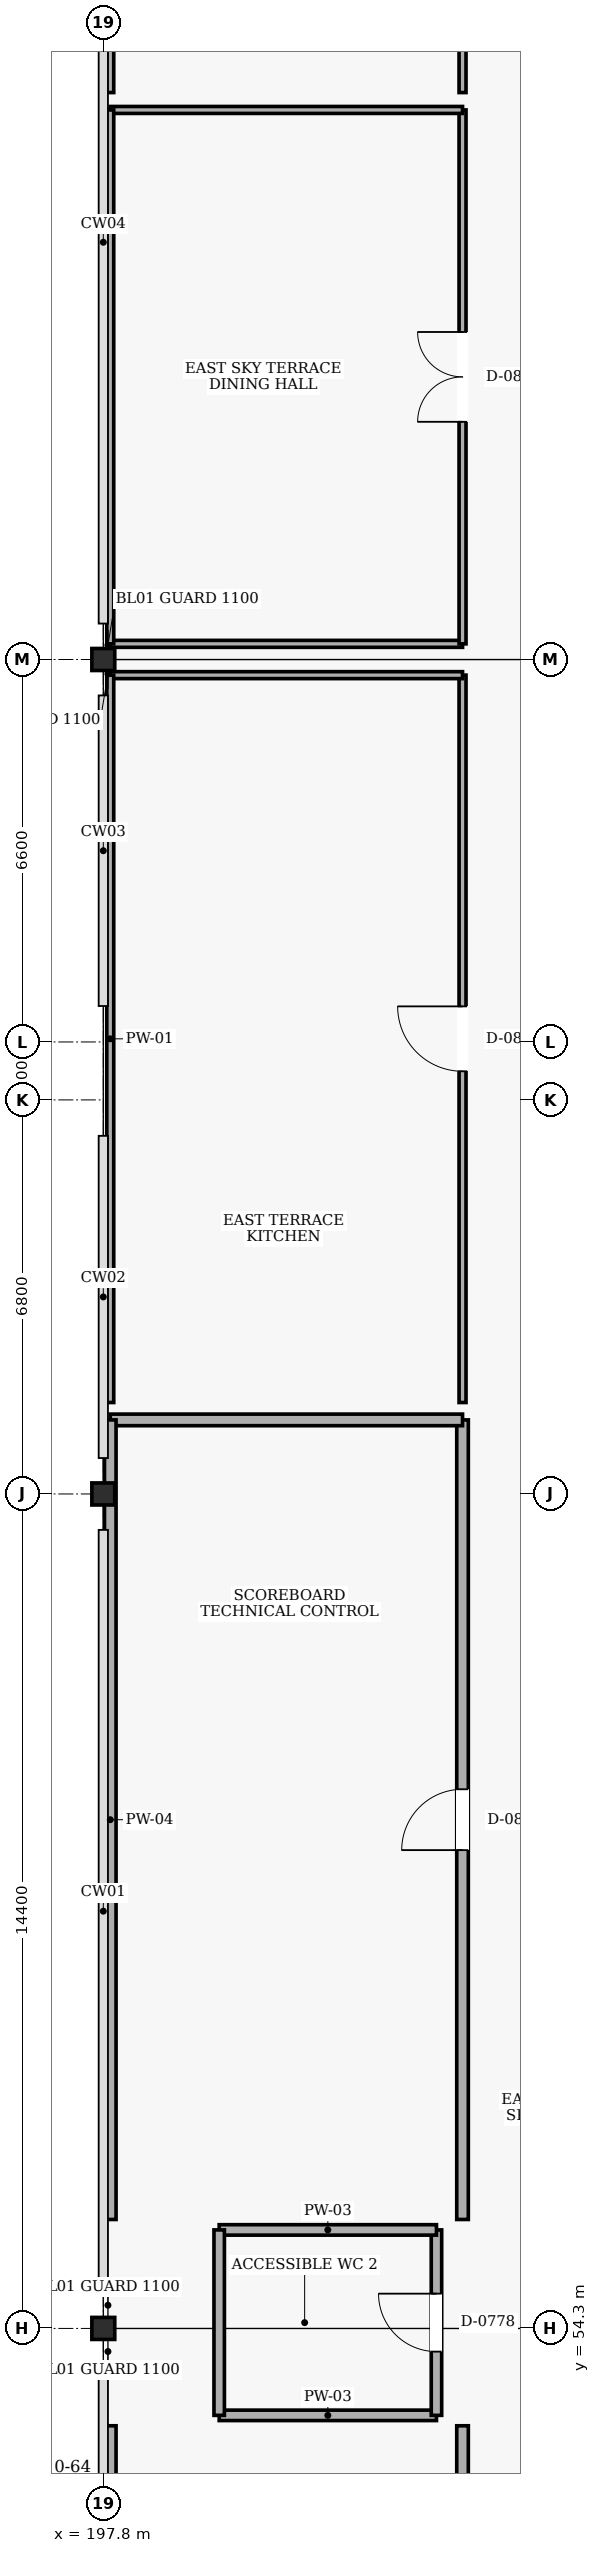
"""IFC4 building model, lengths in metres.
Left out: names, types, materials, properties, quantities, classifications, styles, units other than length and angle.
Written with IfcOpenShell. Run it as: python <this file> out.ifc"""

import sys

from ifc_helpers import new_model, si_unit, direction, frame, frame_2d, origin, origin_2d, place, context, subcontext, project, spatial, rectangle, i_section, extrude, element, fill, save


model = new_model("IFC4")
c1 = context("Model", 3, precision=1e-05, world=origin(), true_north=direction((0.0, 1.0)))
c2 = subcontext(c1, "Body", "Model", "MODEL_VIEW")
j1 = project(units=[si_unit("LENGTHUNIT", "METRE"), si_unit("PLANEANGLEUNIT", "RADIAN")], contexts=[c1])
p1 = place(None, origin())
s1 = spatial("IfcSite", under=j1, at=p1, CompositionType="ELEMENT")
p2 = place(p1, origin())
s2 = spatial("IfcBuilding", under=s1, at=p2, CompositionType="ELEMENT")
p3 = place(p2, frame((0.0, 0.0, 24.6)))
s3 = spatial("IfcBuildingStorey", under=s2, at=p3, CompositionType="ELEMENT", Elevation=24.6)
for number, where, z_axis, x_axis in (
    (1, (197.8, 54.3, 0.0), (0.0, 0.0, 1.0), (1.0, 0.0, 0.0)),
    (2, (197.8, 68.7, 0.0), (0.0, 0.0, 1.0), (1.0, 0.0, 0.0)),
    (3, (197.8, 83.1, 0.0), (0.0, 0.0, 1.0), (1.0, 0.0, 0.0)),
):
    element("IfcColumn", number, at=place(p3, frame(where, z_axis=z_axis, x_axis=x_axis)), inside=s3, PredefinedType="COLUMN", context=c2, shape_type="SweptSolid", body=[
        extrude(i_section(OverallWidth=0.395, OverallDepth=0.38, WebThickness=0.019, FlangeThickness=0.03, at=origin_2d()), origin(), (0.0, 0.0, 1.0), 4.8),
    ])
p4 = place(p3, frame((199.8, 52.8, 0.0), z_axis=(0.0, 0.0, 1.0), x_axis=(1.0, 0.0, 0.0)))
e4 = element("IfcWall", 4, at=p4, inside=s3, PredefinedType="PARTITIONING", context=c2, shape_type="SweptSolid", body=[
    extrude(rectangle(XDim=3.75, YDim=0.18, at=frame_2d((1.875, 0.0))), origin(), (0.0, 0.0, 1.0), 4.5),
])
p5 = place(p3, frame((203.55, 52.8, 0.0), z_axis=(0.0, 0.0, 1.0), x_axis=(0.0, 1.0, 0.0)))
e5 = element("IfcWall", 5, at=p5, inside=s3, PredefinedType="PARTITIONING", context=c2, shape_type="SweptSolid", body=[
    extrude(rectangle(XDim=3.2, YDim=0.18, at=frame_2d((1.6, 0.0))), origin(), (0.0, 0.0, 1.0), 4.5),
])
p6 = place(p5, frame((1.1, 0.0, 0.0)))
e6 = element("IfcOpeningElement", 6, at=p6, cuts=e5, PredefinedType="OPENING", context=c2, shape_type="SweptSolid", body=[
    extrude(rectangle(XDim=1.0, YDim=2.1, at=frame_2d((0.5, 1.05))), frame((0.0, 0.1, 0.0), z_axis=(0.0, -1.0, 0.0), x_axis=(1.0, 0.0, 0.0)), (0.0, 0.0, 1.0), 0.2),
])
p7 = place(p3, frame((203.55, 56.0, 0.0), z_axis=(0.0, 0.0, 1.0), x_axis=(-1.0, 0.0, 0.0)))
e7 = element("IfcWall", 7, at=p7, inside=s3, PredefinedType="PARTITIONING", context=c2, shape_type="SweptSolid", body=[
    extrude(rectangle(XDim=3.75, YDim=0.18, at=frame_2d((1.875, 0.0))), origin(), (0.0, 0.0, 1.0), 4.5),
])
p8 = place(p3, frame((199.8, 56.0, 0.0), z_axis=(0.0, 0.0, 1.0), x_axis=(0.0, -1.0, 0.0)))
e8 = element("IfcWall", 8, at=p8, inside=s3, PredefinedType="PARTITIONING", context=c2, shape_type="SweptSolid", body=[
    extrude(rectangle(XDim=3.2, YDim=0.18, at=frame_2d((1.6, 0.0))), origin(), (0.0, 0.0, 1.0), 4.5),
])
p9 = place(p3, frame((204.0, 44.947, 0.0), z_axis=(0.0, 0.0, 1.0), x_axis=(0.0, 1.0, 0.0)))
e9 = element("IfcWall", 9, at=p9, inside=s3, PredefinedType="PARTITIONING", context=c2, shape_type="SweptSolid", body=[
    extrude(rectangle(XDim=7.674, YDim=0.2, at=frame_2d((3.837, 0.0))), origin(), (0.0, 0.0, 1.0), 4.5),
])
p10 = place(p9, frame((2.657, 0.0, 0.0)))
e10 = element("IfcOpeningElement", 10, at=p10, cuts=e9, PredefinedType="OPENING", context=c2, shape_type="SweptSolid", body=[
    extrude(rectangle(XDim=2.36, YDim=2.4, at=frame_2d((1.18, 1.2))), frame((0.0, 0.11, 0.0), z_axis=(0.0, -1.0, 0.0), x_axis=(1.0, 0.0, 0.0)), (0.0, 0.0, 1.0), 0.22),
])
p11 = place(p3, frame((197.92, 52.62, 0.0), z_axis=(0.0, 0.0, 1.0), x_axis=(0.0, -1.0, 0.0)))
e11 = element("IfcWall", 11, at=p11, inside=s3, PredefinedType="PARTITIONING", context=c2, shape_type="SweptSolid", body=[
    extrude(rectangle(XDim=7.674, YDim=0.2, at=frame_2d((3.837, 0.0))), origin(), (0.0, 0.0, 1.0), 3.58),
])
p12 = place(p3, frame((204.0, 56.18, 0.0), z_axis=(0.0, 0.0, 1.0), x_axis=(0.0, 1.0, 0.0)))
e12 = element("IfcWall", 12, at=p12, inside=s3, PredefinedType="PARTITIONING", context=c2, shape_type="SweptSolid", body=[
    extrude(rectangle(XDim=13.798, YDim=0.2, at=frame_2d((6.899, 0.0))), origin(), (0.0, 0.0, 1.0), 4.5),
])
p13 = place(p12, frame((6.374, 0.0, 0.0)))
e13 = element("IfcOpeningElement", 13, at=p13, cuts=e12, PredefinedType="OPENING", context=c2, shape_type="SweptSolid", body=[
    extrude(rectangle(XDim=1.05, YDim=2.15, at=frame_2d((0.525, 1.075))), frame((0.0, 0.11, 0.0), z_axis=(0.0, -1.0, 0.0), x_axis=(1.0, 0.0, 0.0)), (0.0, 0.0, 1.0), 0.22),
])
p14 = place(p3, frame((204.0, 69.978, 0.0), z_axis=(0.0, 0.0, 1.0), x_axis=(-1.0, 0.0, 0.0)))
e14 = element("IfcWall", 14, at=p14, inside=s3, PredefinedType="PARTITIONING", context=c2, shape_type="SweptSolid", body=[
    extrude(rectangle(XDim=6.08, YDim=0.2, at=frame_2d((3.04, 0.0))), origin(), (0.0, 0.0, 1.0), 4.5),
])
p15 = place(p3, frame((197.92, 69.978, 0.0), z_axis=(0.0, 0.0, 1.0), x_axis=(0.0, -1.0, 0.0)))
e15 = element("IfcWall", 15, at=p15, inside=s3, PredefinedType="PARTITIONING", context=c2, shape_type="SweptSolid", body=[
    extrude(rectangle(XDim=13.798, YDim=0.2, at=frame_2d((6.899, 0.0))), origin(), (0.0, 0.0, 1.0), 3.58),
])
p16 = place(p3, frame((204.0, 70.278, 0.0), z_axis=(0.0, 0.0, 1.0), x_axis=(0.0, 1.0, 0.0)))
e16 = element("IfcWall", 16, at=p16, inside=s3, PredefinedType="PARTITIONING", context=c2, shape_type="SweptSolid", body=[
    extrude(rectangle(XDim=12.552, YDim=0.12, at=frame_2d((6.276, 0.0))), origin(), (0.0, 0.0, 1.0), 4.5),
])
p17 = place(p16, frame((5.716, 0.0, 0.0)))
e17 = element("IfcOpeningElement", 17, at=p17, cuts=e16, PredefinedType="OPENING", context=c2, shape_type="SweptSolid", body=[
    extrude(rectangle(XDim=1.12, YDim=2.15, at=frame_2d((0.56, 1.075))), frame((0.0, 0.07, 0.0), z_axis=(0.0, -1.0, 0.0), x_axis=(1.0, 0.0, 0.0)), (0.0, 0.0, 1.0), 0.14),
])
p18 = place(p3, frame((204.0, 82.83, 0.0), z_axis=(0.0, 0.0, 1.0), x_axis=(-1.0, 0.0, 0.0)))
e18 = element("IfcWall", 18, at=p18, inside=s3, PredefinedType="PARTITIONING", context=c2, shape_type="SweptSolid", body=[
    extrude(rectangle(XDim=6.08, YDim=0.12, at=frame_2d((3.04, 0.0))), origin(), (0.0, 0.0, 1.0), 3.78),
])
p19 = place(p3, frame((197.92, 82.83, 0.0), z_axis=(0.0, 0.0, 1.0), x_axis=(0.0, -1.0, 0.0)))
e19 = element("IfcWall", 19, at=p19, inside=s3, PredefinedType="PARTITIONING", context=c2, shape_type="SweptSolid", body=[
    extrude(rectangle(XDim=12.552, YDim=0.12, at=frame_2d((6.276, 0.0))), origin(), (0.0, 0.0, 1.0), 3.58),
])
p20 = place(p3, frame((197.92, 83.37, 0.0), z_axis=(0.0, 0.0, 1.0), x_axis=(1.0, 0.0, 0.0)))
e20 = element("IfcWall", 20, at=p20, inside=s3, PredefinedType="PARTITIONING", context=c2, shape_type="SweptSolid", body=[
    extrude(rectangle(XDim=6.08, YDim=0.12, at=frame_2d((3.04, 0.0))), origin(), (0.0, 0.0, 1.0), 3.78),
])
p21 = place(p3, frame((204.0, 83.37, 0.0), z_axis=(0.0, 0.0, 1.0), x_axis=(0.0, 1.0, 0.0)))
e21 = element("IfcWall", 21, at=p21, inside=s3, PredefinedType="PARTITIONING", context=c2, shape_type="SweptSolid", body=[
    extrude(rectangle(XDim=9.213, YDim=0.12, at=frame_2d((4.606, 0.0))), origin(), (0.0, 0.0, 1.0), 4.5),
])
p22 = place(p21, frame((3.832, 0.0, 0.0)))
e22 = element("IfcOpeningElement", 22, at=p22, cuts=e21, PredefinedType="OPENING", context=c2, shape_type="SweptSolid", body=[
    extrude(rectangle(XDim=1.55, YDim=2.2, at=frame_2d((0.775, 1.1))), frame((0.0, 0.07, 0.0), z_axis=(0.0, -1.0, 0.0), x_axis=(1.0, 0.0, 0.0)), (0.0, 0.0, 1.0), 0.14),
])
p23 = place(p3, frame((204.0, 92.583, 0.0), z_axis=(0.0, 0.0, 1.0), x_axis=(-1.0, 0.0, 0.0)))
e23 = element("IfcWall", 23, at=p23, inside=s3, PredefinedType="PARTITIONING", context=c2, shape_type="SweptSolid", body=[
    extrude(rectangle(XDim=6.08, YDim=0.12, at=frame_2d((3.04, 0.0))), origin(), (0.0, 0.0, 1.0), 4.5),
])
p24 = place(p3, frame((197.92, 92.583, 0.0), z_axis=(0.0, 0.0, 1.0), x_axis=(0.0, -1.0, 0.0)))
e24 = element("IfcWall", 24, at=p24, inside=s3, PredefinedType="PARTITIONING", context=c2, shape_type="SweptSolid", body=[
    extrude(rectangle(XDim=9.213, YDim=0.12, at=frame_2d((4.606, 0.0))), origin(), (0.0, 0.0, 1.0), 3.58),
])
p25 = place(p3, frame((204.0, 92.883, 0.0), z_axis=(0.0, 0.0, 1.0), x_axis=(0.0, 1.0, 0.0)))
e25 = element("IfcWall", 25, at=p25, inside=s3, PredefinedType="PARTITIONING", context=c2, shape_type="SweptSolid", body=[
    extrude(rectangle(XDim=8.933, YDim=0.12, at=frame_2d((4.467, 0.0))), origin(), (0.0, 0.0, 1.0), 4.5),
])
p26 = place(p25, frame((3.627, 0.0, 0.0)))
e26 = element("IfcOpeningElement", 26, at=p26, cuts=e25, PredefinedType="OPENING", context=c2, shape_type="SweptSolid", body=[
    extrude(rectangle(XDim=1.68, YDim=2.25, at=frame_2d((0.84, 1.125))), frame((0.0, 0.07, 0.0), z_axis=(0.0, -1.0, 0.0), x_axis=(1.0, 0.0, 0.0)), (0.0, 0.0, 1.0), 0.14),
])
p27 = place(p3, frame((197.92, 101.817, 0.0), z_axis=(0.0, 0.0, 1.0), x_axis=(0.0, -1.0, 0.0)))
e27 = element("IfcWall", 27, at=p27, inside=s3, PredefinedType="PARTITIONING", context=c2, shape_type="SweptSolid", body=[
    extrude(rectangle(XDim=8.933, YDim=0.12, at=frame_2d((4.467, 0.0))), origin(), (0.0, 0.0, 1.0), 3.58),
])
p28 = place(p6, origin())
e28 = element("IfcDoor", 28, at=p28, inside=s3, OperationType="SINGLE_SWING_RIGHT", PredefinedType="DOOR", context=c2, shape_type="SweptSolid", body=[
    extrude(rectangle(XDim=1.0, YDim=2.1, at=frame_2d((0.5, 1.05))), frame((0.0, 0.025, 0.0), z_axis=(0.0, -1.0, 0.0), x_axis=(1.0, 0.0, 0.0)), (0.0, 0.0, 1.0), 0.05),
])
fill(e6, e28)
p29 = place(p13, origin())
e29 = element("IfcDoor", 29, at=p29, inside=s3, OperationType="SINGLE_SWING_LEFT", PredefinedType="DOOR", context=c2, shape_type="SweptSolid", body=[
    extrude(rectangle(XDim=1.05, YDim=2.15, at=frame_2d((0.525, 1.075))), frame((0.0, 0.025, 0.0), z_axis=(0.0, -1.0, 0.0), x_axis=(1.0, 0.0, 0.0)), (0.0, 0.0, 1.0), 0.05),
])
fill(e13, e29)
p30 = place(p17, origin())
e30 = element("IfcDoor", 30, at=p30, inside=s3, OperationType="SINGLE_SWING_RIGHT", PredefinedType="DOOR", context=c2, shape_type="SweptSolid", body=[
    extrude(rectangle(XDim=1.12, YDim=2.15, at=frame_2d((0.56, 1.075))), frame((0.0, 0.025, 0.0), z_axis=(0.0, -1.0, 0.0), x_axis=(1.0, 0.0, 0.0)), (0.0, 0.0, 1.0), 0.05),
])
fill(e17, e30)
p31 = place(p22, origin())
e31 = element("IfcDoor", 31, at=p31, inside=s3, OperationType="DOUBLE_DOOR_SINGLE_SWING", PredefinedType="DOOR", context=c2, shape_type="SweptSolid", body=[
    extrude(rectangle(XDim=1.55, YDim=2.2, at=frame_2d((0.775, 1.1))), frame((0.0, 0.025, 0.0), z_axis=(0.0, -1.0, 0.0), x_axis=(1.0, 0.0, 0.0)), (0.0, 0.0, 1.0), 0.05),
])
fill(e22, e31)
save(model, sys.argv[1])
